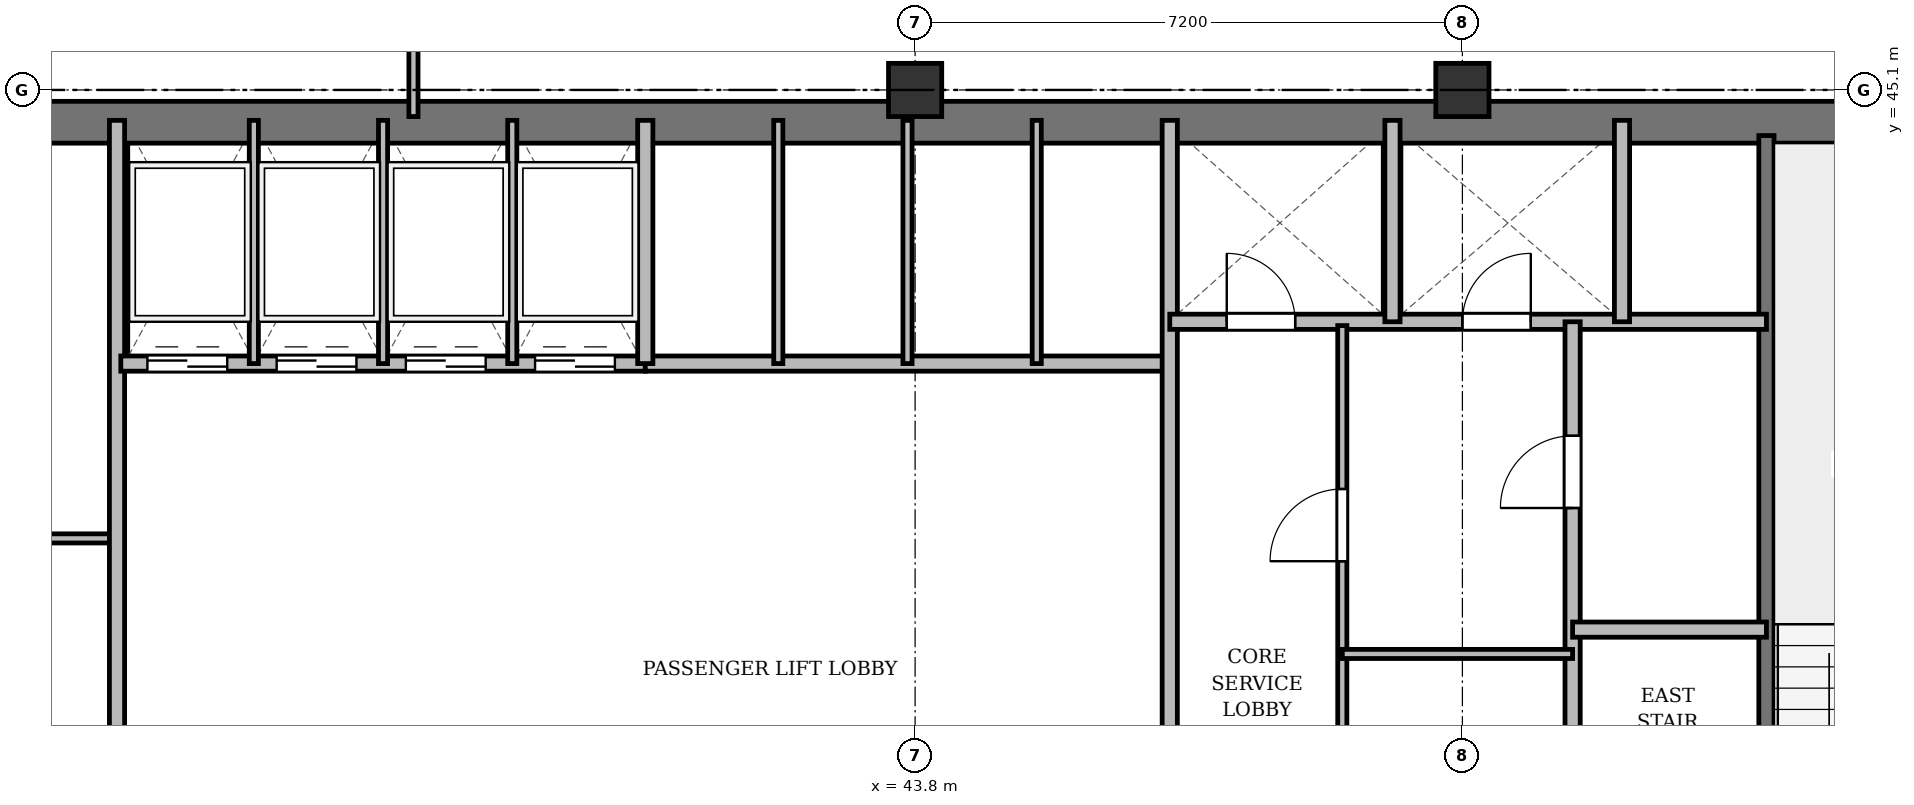
"""IFC4 building model, lengths in metres.
Left out: names, types, materials, properties, quantities, classifications, styles, units other than length and angle.
Written with IfcOpenShell. Run it as: python <this file> out.ifc"""

import sys

from ifc_helpers import new_model, si_unit, direction, frame, frame_2d, origin, origin_2d, place, context, subcontext, project, spatial, rectangle, extrude, source, transform, mapped, element, fill, save


model = new_model("IFC4")
c1 = context("Model", 3, precision=1e-05, world=origin(), true_north=direction((0.0, 1.0)))
c2 = subcontext(c1, "Body", "Model", "MODEL_VIEW")
j1 = project(units=[si_unit("LENGTHUNIT", "METRE"), si_unit("PLANEANGLEUNIT", "RADIAN")], contexts=[c1])
p1 = place(None, origin())
s1 = spatial("IfcSite", under=j1, at=p1, CompositionType="ELEMENT")
p2 = place(p1, origin())
s2 = spatial("IfcBuilding", under=s1, at=p2, CompositionType="ELEMENT")
p3 = place(p2, frame((0.0, 0.0, 164.5)))
s3 = spatial("IfcBuildingStorey", under=s2, at=p3, CompositionType="ELEMENT", Elevation=164.5)
m1 = source(origin(), c2, "Body", "SweptSolid", [
    extrude(rectangle(XDim=0.7, YDim=0.7, at=origin_2d()), origin(), (0.0, 0.0, 1.0), 3.6),
])
for number, where, z_axis, x_axis in (
    (1, (43.8, 45.1, 0.0), (0.0, 0.0, 1.0), (1.0, 0.0, 0.0)),
    (2, (51.0, 45.1, 0.0), (0.0, 0.0, 1.0), (1.0, 0.0, 0.0)),
):
    element("IfcColumn", number, at=place(p3, frame(where, z_axis=z_axis, x_axis=x_axis)), inside=s3, PredefinedType="COLUMN", context=c2, shape_type="MappedRepresentation", body=[
        mapped(m1, transform((0.0, 0.0, 0.0), x_axis=(1.0, 0.0, 0.0), y_axis=(0.0, 1.0, 0.0), z_axis=(0.0, 0.0, 1.0), scale=1.0)),
    ])
p4 = place(p3, frame((15.65, 44.675, 0.0), z_axis=(0.0, 0.0, 1.0), x_axis=(1.0, 0.0, 0.0)))
e3 = element("IfcWall", 3, at=p4, inside=s3, PredefinedType="SHEAR", context=c2, shape_type="SweptSolid", body=[
    extrude(rectangle(XDim=43.1, YDim=0.55, at=frame_2d((21.55, 0.0))), origin(), (0.0, 0.0, 1.0), 3.35),
])
p5 = place(p3, frame((55.0, 33.4, 0.0), z_axis=(0.0, 0.0, 1.0), x_axis=(0.0, 1.0, 0.0)))
e4 = element("IfcWall", 4, at=p5, inside=s3, PredefinedType="SHEAR", context=c2, shape_type="SweptSolid", body=[
    extrude(rectangle(XDim=11.1, YDim=0.2, at=frame_2d((5.55, 0.0))), origin(), (0.0, 0.0, 1.0), 3.35),
])
p6 = place(p5, frame((0.85, 0.0, 0.0)))
e5 = element("IfcOpeningElement", 5, at=p6, cuts=e4, PredefinedType="OPENING", context=c2, shape_type="SweptSolid", body=[
    extrude(rectangle(XDim=1.1, YDim=2.15, at=frame_2d((0.55, 1.075))), frame((0.0, 0.11, 0.0), z_axis=(0.0, -1.0, 0.0), x_axis=(1.0, 0.0, 0.0)), (0.0, 0.0, 1.0), 0.22),
])
p7 = place(p3, frame((26.3, 39.2, 0.0), z_axis=(0.0, 0.0, 1.0), x_axis=(1.0, 0.0, 0.0)))
e6 = element("IfcWall", 6, at=p7, inside=s3, PredefinedType="PARTITIONING", context=c2, shape_type="SweptSolid", body=[
    extrude(rectangle(XDim=7.0, YDim=0.12, at=frame_2d((3.5, 0.0))), origin(), (0.0, 0.0, 1.0), 2.85),
])
p8 = place(p7, frame((2.6, 0.0, 0.0)))
e7 = element("IfcOpeningElement", 7, at=p8, cuts=e6, PredefinedType="OPENING", context=c2, shape_type="SweptSolid", body=[
    extrude(rectangle(XDim=0.95, YDim=2.15, at=frame_2d((0.475, 1.075))), frame((0.0, 0.07, 0.0), z_axis=(0.0, -1.0, 0.0), x_axis=(1.0, 0.0, 0.0)), (0.0, 0.0, 1.0), 0.14),
])
p9 = place(p3, frame((33.3, 33.4, 0.0), z_axis=(0.0, 0.0, 1.0), x_axis=(0.0, 1.0, 0.0)))
e8 = element("IfcWall", 8, at=p9, inside=s3, PredefinedType="SOLIDWALL", context=c2, shape_type="SweptSolid", body=[
    extrude(rectangle(XDim=11.3, YDim=0.2, at=frame_2d((5.65, 0.0))), origin(), (0.0, 0.0, 1.0), 2.75),
])
p10 = place(p3, frame((33.35, 41.5, 0.0), z_axis=(0.0, 0.0, 1.0), x_axis=(1.0, 0.0, 0.0)))
e9 = element("IfcWall", 9, at=p10, inside=s3, PredefinedType="SOLIDWALL", context=c2, shape_type="SweptSolid", body=[
    extrude(rectangle(XDim=6.9, YDim=0.2, at=frame_2d((3.45, 0.0))), origin(), (0.0, 0.0, 1.0), 3.35),
])
p11 = place(p10, frame((0.35, 0.0, 0.0)))
e10 = element("IfcOpeningElement", 10, at=p11, cuts=e9, PredefinedType="OPENING", context=c2, shape_type="SweptSolid", body=[
    extrude(rectangle(XDim=1.05, YDim=2.15, at=frame_2d((0.525, 1.075))), frame((0.0, 0.11, 0.0), z_axis=(0.0, -1.0, 0.0), x_axis=(1.0, 0.0, 0.0)), (0.0, 0.0, 1.0), 0.22),
])
p12 = place(p10, frame((2.05, 0.0, 0.0)))
e11 = element("IfcOpeningElement", 11, at=p12, cuts=e9, PredefinedType="OPENING", context=c2, shape_type="SweptSolid", body=[
    extrude(rectangle(XDim=1.05, YDim=2.15, at=frame_2d((0.525, 1.075))), frame((0.0, 0.11, 0.0), z_axis=(0.0, -1.0, 0.0), x_axis=(1.0, 0.0, 0.0)), (0.0, 0.0, 1.0), 0.22),
])
p13 = place(p10, frame((3.75, 0.0, 0.0)))
e12 = element("IfcOpeningElement", 12, at=p13, cuts=e9, PredefinedType="OPENING", context=c2, shape_type="SweptSolid", body=[
    extrude(rectangle(XDim=1.05, YDim=2.15, at=frame_2d((0.525, 1.075))), frame((0.0, 0.11, 0.0), z_axis=(0.0, -1.0, 0.0), x_axis=(1.0, 0.0, 0.0)), (0.0, 0.0, 1.0), 0.22),
])
p14 = place(p10, frame((5.45, 0.0, 0.0)))
e13 = element("IfcOpeningElement", 13, at=p14, cuts=e9, PredefinedType="OPENING", context=c2, shape_type="SweptSolid", body=[
    extrude(rectangle(XDim=1.05, YDim=2.15, at=frame_2d((0.525, 1.075))), frame((0.0, 0.11, 0.0), z_axis=(0.0, -1.0, 0.0), x_axis=(1.0, 0.0, 0.0)), (0.0, 0.0, 1.0), 0.22),
])
for number, where, z_axis, x_axis in (
    (14, (35.1, 41.5, 0.0), (0.0, 0.0, 1.0), (0.0, 1.0, 0.0)),
    (15, (36.8, 41.5, 0.0), (0.0, 0.0, 1.0), (0.0, 1.0, 0.0)),
    (16, (38.5, 41.5, 0.0), (0.0, 0.0, 1.0), (0.0, 1.0, 0.0)),
):
    element("IfcWall", number, at=place(p3, frame(where, z_axis=z_axis, x_axis=x_axis)), inside=s3, PredefinedType="PARTITIONING", context=c2, shape_type="SweptSolid", body=[
        extrude(rectangle(XDim=3.2, YDim=0.12, at=frame_2d((1.6, 0.0))), origin(), (0.0, 0.0, 1.0), 3.35),
    ])
p15 = place(p3, frame((40.25, 41.5, 0.0), z_axis=(0.0, 0.0, 1.0), x_axis=(1.0, 0.0, 0.0)))
e17 = element("IfcWall", 17, at=p15, inside=s3, PredefinedType="SOLIDWALL", context=c2, shape_type="SweptSolid", body=[
    extrude(rectangle(XDim=6.9, YDim=0.2, at=frame_2d((3.45, 0.0))), origin(), (0.0, 0.0, 1.0), 2.85),
])
p16 = place(p3, frame((40.25, 41.5, 0.0), z_axis=(0.0, 0.0, 1.0), x_axis=(0.0, 1.0, 0.0)))
e18 = element("IfcWall", 18, at=p16, inside=s3, PredefinedType="SOLIDWALL", context=c2, shape_type="SweptSolid", body=[
    extrude(rectangle(XDim=3.2, YDim=0.2, at=frame_2d((1.6, 0.0))), origin(), (0.0, 0.0, 1.0), 3.35),
])
p17 = place(p3, frame((42.0, 41.5, 0.0), z_axis=(0.0, 0.0, 1.0), x_axis=(0.0, 1.0, 0.0)))
e19 = element("IfcWall", 19, at=p17, inside=s3, PredefinedType="PARTITIONING", context=c2, shape_type="SweptSolid", body=[
    extrude(rectangle(XDim=3.2, YDim=0.12, at=frame_2d((1.6, 0.0))), origin(), (0.0, 0.0, 1.0), 3.35),
])
p18 = place(p3, frame((43.7, 41.5, 0.0), z_axis=(0.0, 0.0, 1.0), x_axis=(0.0, 1.0, 0.0)))
e20 = element("IfcWall", 20, at=p18, inside=s3, PredefinedType="PARTITIONING", context=c2, shape_type="SweptSolid", body=[
    extrude(rectangle(XDim=3.2, YDim=0.12, at=frame_2d((1.6, 0.0))), origin(), (0.0, 0.0, 1.0), 2.85),
])
p19 = place(p3, frame((45.4, 41.5, 0.0), z_axis=(0.0, 0.0, 1.0), x_axis=(0.0, 1.0, 0.0)))
e21 = element("IfcWall", 21, at=p19, inside=s3, PredefinedType="PARTITIONING", context=c2, shape_type="SweptSolid", body=[
    extrude(rectangle(XDim=3.2, YDim=0.12, at=frame_2d((1.6, 0.0))), origin(), (0.0, 0.0, 1.0), 3.35),
])
p20 = place(p3, frame((47.15, 33.4, 0.0), z_axis=(0.0, 0.0, 1.0), x_axis=(0.0, 1.0, 0.0)))
e22 = element("IfcWall", 22, at=p20, inside=s3, PredefinedType="SOLIDWALL", context=c2, shape_type="SweptSolid", body=[
    extrude(rectangle(XDim=11.3, YDim=0.2, at=frame_2d((5.65, 0.0))), origin(), (0.0, 0.0, 1.0), 2.75),
])
p21 = place(p3, frame((47.15, 42.05, 0.0), z_axis=(0.0, 0.0, 1.0), x_axis=(1.0, 0.0, 0.0)))
e23 = element("IfcWall", 23, at=p21, inside=s3, PredefinedType="SOLIDWALL", context=c2, shape_type="SweptSolid", body=[
    extrude(rectangle(XDim=7.85, YDim=0.2, at=frame_2d((3.925, 0.0))), origin(), (0.0, 0.0, 1.0), 2.85),
])
p22 = place(p21, frame((0.75, 0.0, 0.0)))
e24 = element("IfcOpeningElement", 24, at=p22, cuts=e23, PredefinedType="OPENING", context=c2, shape_type="SweptSolid", body=[
    extrude(rectangle(XDim=0.9, YDim=2.1, at=frame_2d((0.45, 1.05))), frame((0.0, 0.11, 0.0), z_axis=(0.0, -1.0, 0.0), x_axis=(1.0, 0.0, 0.0)), (0.0, 0.0, 1.0), 0.22),
])
p23 = place(p21, frame((3.85, 0.0, 0.0)))
e25 = element("IfcOpeningElement", 25, at=p23, cuts=e23, PredefinedType="OPENING", context=c2, shape_type="SweptSolid", body=[
    extrude(rectangle(XDim=0.9, YDim=2.1, at=frame_2d((0.45, 1.05))), frame((0.0, 0.11, 0.0), z_axis=(0.0, -1.0, 0.0), x_axis=(1.0, 0.0, 0.0)), (0.0, 0.0, 1.0), 0.22),
])
for number, where, z_axis, x_axis in (
    (26, (50.08, 42.05, 0.0), (0.0, 0.0, 1.0), (0.0, 1.0, 0.0)),
    (27, (53.1, 42.05, 0.0), (0.0, 0.0, 1.0), (0.0, 1.0, 0.0)),
):
    element("IfcWall", number, at=place(p3, frame(where, z_axis=z_axis, x_axis=x_axis)), inside=s3, PredefinedType="SOLIDWALL", context=c2, shape_type="SweptSolid", body=[
        extrude(rectangle(XDim=2.65, YDim=0.2, at=frame_2d((1.325, 0.0))), origin(), (0.0, 0.0, 1.0), 3.35),
    ])
p24 = place(p3, frame((52.45, 33.4, 0.0), z_axis=(0.0, 0.0, 1.0), x_axis=(0.0, 1.0, 0.0)))
e28 = element("IfcWall", 28, at=p24, inside=s3, PredefinedType="PARTITIONING", context=c2, shape_type="SweptSolid", body=[
    extrude(rectangle(XDim=8.65, YDim=0.2, at=frame_2d((4.325, 0.0))), origin(), (0.0, 0.0, 1.0), 2.75),
])
p25 = place(p24, frame((6.2, 0.0, 0.0)))
e29 = element("IfcOpeningElement", 29, at=p25, cuts=e28, PredefinedType="OPENING", context=c2, shape_type="SweptSolid", body=[
    extrude(rectangle(XDim=0.95, YDim=2.15, at=frame_2d((0.475, 1.075))), frame((0.0, 0.11, 0.0), z_axis=(0.0, -1.0, 0.0), x_axis=(1.0, 0.0, 0.0)), (0.0, 0.0, 1.0), 0.22),
])
p26 = place(p3, frame((52.45, 38.0, 0.0), z_axis=(0.0, 0.0, 1.0), x_axis=(1.0, 0.0, 0.0)))
e30 = element("IfcWall", 30, at=p26, inside=s3, PredefinedType="PARTITIONING", context=c2, shape_type="SweptSolid", body=[
    extrude(rectangle(XDim=2.55, YDim=0.2, at=frame_2d((1.275, 0.0))), origin(), (0.0, 0.0, 1.0), 3.35),
])
p27 = place(p3, frame((49.42, 33.4, 0.0), z_axis=(0.0, 0.0, 1.0), x_axis=(0.0, 1.0, 0.0)))
e31 = element("IfcWall", 31, at=p27, inside=s3, PredefinedType="PARTITIONING", context=c2, shape_type="SweptSolid", body=[
    extrude(rectangle(XDim=8.6, YDim=0.12, at=frame_2d((4.3, 0.0))), origin(), (0.0, 0.0, 1.0), 2.75),
])
p28 = place(p27, frame((1.3, 0.0, 0.0)))
e32 = element("IfcOpeningElement", 32, at=p28, cuts=e31, PredefinedType="OPENING", context=c2, shape_type="SweptSolid", body=[
    extrude(rectangle(XDim=0.95, YDim=2.15, at=frame_2d((0.475, 1.075))), frame((0.0, 0.07, 0.0), z_axis=(0.0, -1.0, 0.0), x_axis=(1.0, 0.0, 0.0)), (0.0, 0.0, 1.0), 0.14),
])
p29 = place(p27, frame((5.5, 0.0, 0.0)))
e33 = element("IfcOpeningElement", 33, at=p29, cuts=e31, PredefinedType="OPENING", context=c2, shape_type="SweptSolid", body=[
    extrude(rectangle(XDim=0.95, YDim=2.15, at=frame_2d((0.475, 1.075))), frame((0.0, 0.07, 0.0), z_axis=(0.0, -1.0, 0.0), x_axis=(1.0, 0.0, 0.0)), (0.0, 0.0, 1.0), 0.14),
])
p30 = place(p3, frame((49.42, 37.68, 0.0), z_axis=(0.0, 0.0, 1.0), x_axis=(1.0, 0.0, 0.0)))
e34 = element("IfcWall", 34, at=p30, inside=s3, PredefinedType="PARTITIONING", context=c2, shape_type="SweptSolid", body=[
    extrude(rectangle(XDim=3.03, YDim=0.12, at=frame_2d((1.515, 0.0))), origin(), (0.0, 0.0, 1.0), 2.85),
])
p31 = place(p3, frame((37.2, 44.75, 0.0), z_axis=(0.0, 0.0, 1.0), x_axis=(0.0, 1.0, 0.0)))
e35 = element("IfcWall", 35, at=p31, inside=s3, PredefinedType="PARTITIONING", context=c2, shape_type="SweptSolid", body=[
    extrude(rectangle(XDim=3.61, YDim=0.12, at=frame_2d((1.805, 0.0))), origin(), (0.0, 0.0, 1.0), 2.75),
])
p32 = place(p31, frame((1.1, 0.0, 0.0)))
e36 = element("IfcOpeningElement", 36, at=p32, cuts=e35, PredefinedType="OPENING", context=c2, shape_type="SweptSolid", body=[
    extrude(rectangle(XDim=0.95, YDim=2.15, at=frame_2d((0.475, 1.075))), frame((0.0, 0.07, 0.0), z_axis=(0.0, -1.0, 0.0), x_axis=(1.0, 0.0, 0.0)), (0.0, 0.0, 1.0), 0.14),
])
m2 = source(origin(), c2, "Body", "SweptSolid", [
    extrude(rectangle(XDim=1.05, YDim=2.15, at=frame_2d((0.525, 1.075))), frame((0.0, 0.025, 0.0), z_axis=(0.0, -1.0, 0.0), x_axis=(1.0, 0.0, 0.0)), (0.0, 0.0, 1.0), 0.05),
])
p33 = place(p11, origin())
e37 = element("IfcDoor", 37, at=p33, inside=s3, OperationType="DOUBLE_DOOR_SLIDING", PredefinedType="DOOR", context=c2, shape_type="MappedRepresentation", body=[
    mapped(m2, transform((0.0, 0.0, 0.0), x_axis=(1.0, 0.0, 0.0), y_axis=(0.0, 1.0, 0.0), z_axis=(0.0, 0.0, 1.0), scale=1.0)),
])
fill(e10, e37)
p34 = place(p12, origin())
e38 = element("IfcDoor", 38, at=p34, inside=s3, OperationType="DOUBLE_DOOR_SLIDING", PredefinedType="DOOR", context=c2, shape_type="MappedRepresentation", body=[
    mapped(m2, transform((0.0, 0.0, 0.0), x_axis=(1.0, 0.0, 0.0), y_axis=(0.0, 1.0, 0.0), z_axis=(0.0, 0.0, 1.0), scale=1.0)),
])
fill(e11, e38)
p35 = place(p13, origin())
e39 = element("IfcDoor", 39, at=p35, inside=s3, OperationType="DOUBLE_DOOR_SLIDING", PredefinedType="DOOR", context=c2, shape_type="MappedRepresentation", body=[
    mapped(m2, transform((0.0, 0.0, 0.0), x_axis=(1.0, 0.0, 0.0), y_axis=(0.0, 1.0, 0.0), z_axis=(0.0, 0.0, 1.0), scale=1.0)),
])
fill(e12, e39)
p36 = place(p14, origin())
e40 = element("IfcDoor", 40, at=p36, inside=s3, OperationType="DOUBLE_DOOR_SLIDING", PredefinedType="DOOR", context=c2, shape_type="MappedRepresentation", body=[
    mapped(m2, transform((0.0, 0.0, 0.0), x_axis=(1.0, 0.0, 0.0), y_axis=(0.0, 1.0, 0.0), z_axis=(0.0, 0.0, 1.0), scale=1.0)),
])
fill(e13, e40)
m3 = source(origin(), c2, "Body", "SweptSolid", [
    extrude(rectangle(XDim=0.9, YDim=2.1, at=frame_2d((0.45, 1.05))), frame((0.0, 0.025, 0.0), z_axis=(0.0, -1.0, 0.0), x_axis=(1.0, 0.0, 0.0)), (0.0, 0.0, 1.0), 0.05),
])
p37 = place(p22, origin())
e41 = element("IfcDoor", 41, at=p37, inside=s3, OperationType="SINGLE_SWING_LEFT", PredefinedType="DOOR", context=c2, shape_type="MappedRepresentation", body=[
    mapped(m3, transform((0.0, 0.0, 0.0), x_axis=(1.0, 0.0, 0.0), y_axis=(0.0, 1.0, 0.0), z_axis=(0.0, 0.0, 1.0), scale=1.0)),
])
fill(e24, e41)
p38 = place(p23, origin())
e42 = element("IfcDoor", 42, at=p38, inside=s3, OperationType="SINGLE_SWING_RIGHT", PredefinedType="DOOR", context=c2, shape_type="MappedRepresentation", body=[
    mapped(m3, transform((0.0, 0.0, 0.0), x_axis=(1.0, 0.0, 0.0), y_axis=(0.0, 1.0, 0.0), z_axis=(0.0, 0.0, 1.0), scale=1.0)),
])
fill(e25, e42)
m4 = source(origin(), c2, "Body", "SweptSolid", [
    extrude(rectangle(XDim=0.95, YDim=2.15, at=frame_2d((0.475, 1.075))), frame((0.0, 0.025, 0.0), z_axis=(0.0, -1.0, 0.0), x_axis=(1.0, 0.0, 0.0)), (0.0, 0.0, 1.0), 0.05),
])
p39 = place(p25, origin())
e43 = element("IfcDoor", 43, at=p39, inside=s3, OperationType="SINGLE_SWING_LEFT", PredefinedType="DOOR", context=c2, shape_type="MappedRepresentation", body=[
    mapped(m4, transform((0.0, 0.0, 0.0), x_axis=(1.0, 0.0, 0.0), y_axis=(0.0, 1.0, 0.0), z_axis=(0.0, 0.0, 1.0), scale=1.0)),
])
fill(e29, e43)
p40 = place(p29, origin())
e44 = element("IfcDoor", 44, at=p40, inside=s3, OperationType="SINGLE_SWING_LEFT", PredefinedType="DOOR", context=c2, shape_type="MappedRepresentation", body=[
    mapped(m4, transform((0.0, 0.0, 0.0), x_axis=(1.0, 0.0, 0.0), y_axis=(0.0, 1.0, 0.0), z_axis=(0.0, 0.0, 1.0), scale=1.0)),
])
fill(e33, e44)
save(model, sys.argv[1])
